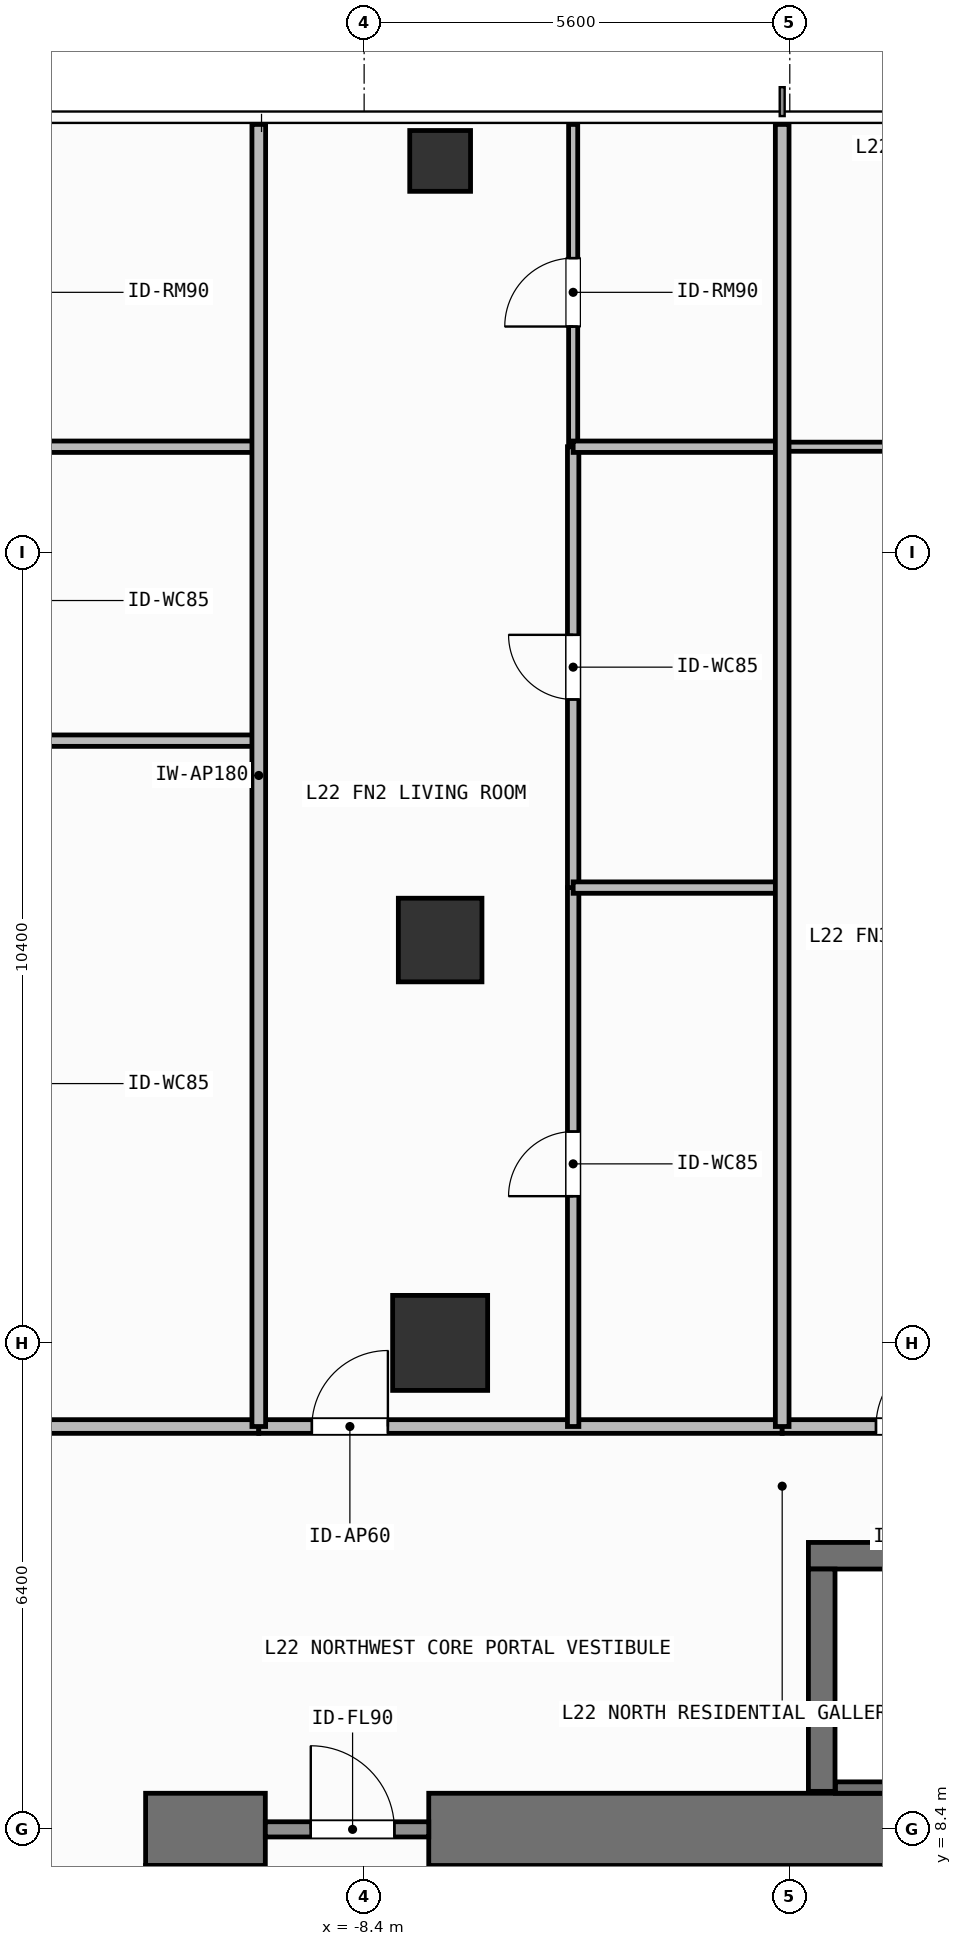
"""IFC4 building model, lengths in metres.
Left out: names, types, materials, properties, quantities, classifications, styles, units other than length and angle.
Written with IfcOpenShell. Run it as: python <this file> out.ifc"""

import sys

from ifc_helpers import new_model, si_unit, direction, frame, frame_2d, origin, origin_2d, place, context, subcontext, project, spatial, rectangle, hollow_rectangle, extrude, element, fill, save


model = new_model("IFC4")
c1 = context("Model", 3, precision=1e-05, world=origin(), true_north=direction((0.0, 1.0)))
c2 = subcontext(c1, "Body", "Model", "MODEL_VIEW")
j1 = project(units=[si_unit("LENGTHUNIT", "METRE"), si_unit("PLANEANGLEUNIT", "RADIAN")], contexts=[c1])
p1 = place(None, origin())
s1 = spatial("IfcSite", under=j1, at=p1, CompositionType="ELEMENT")
p2 = place(p1, origin())
s2 = spatial("IfcBuilding", under=s1, at=p2, CompositionType="ELEMENT")
p3 = place(p2, frame((0.0, 0.0, 89.1)))
s3 = spatial("IfcBuildingStorey", under=s2, at=p3, CompositionType="ELEMENT", Elevation=89.1)
p4 = place(p3, frame((-11.275, 8.4, 0.0), z_axis=(0.0, 0.0, 1.0), x_axis=(1.0, 0.0, 0.0)))
e1 = element("IfcWall", 1, at=p4, inside=s3, PredefinedType="SHEAR", context=c2, shape_type="SweptSolid", body=[
    extrude(rectangle(XDim=1.575, YDim=0.95, at=frame_2d((0.788, 0.0))), origin(), (0.0, 0.0, 1.0), 3.9),
])
p5 = place(p3, frame((-7.55, 8.4, 0.0), z_axis=(0.0, 0.0, 1.0), x_axis=(1.0, 0.0, 0.0)))
e2 = element("IfcWall", 2, at=p5, inside=s3, PredefinedType="SHEAR", context=c2, shape_type="SweptSolid", body=[
    extrude(rectangle(XDim=16.425, YDim=0.95, at=frame_2d((8.212, 0.0))), origin(), (0.0, 0.0, 1.0), 3.9),
])
p6 = place(p3, frame((-10.8, -7.925, 0.0), z_axis=(0.0, 0.0, 1.0), x_axis=(0.0, 1.0, 0.0)))
e3 = element("IfcWall", 3, at=p6, inside=s3, PredefinedType="SHEAR", context=c2, shape_type="SweptSolid", body=[
    extrude(rectangle(XDim=15.85, YDim=0.95, at=frame_2d((7.925, 0.0))), origin(), (0.0, 0.0, 1.0), 3.9),
])
p7 = place(p3, frame((-2.555, 12.0, 0.0), z_axis=(0.0, 0.0, 1.0), x_axis=(1.0, 0.0, 0.0)))
e4 = element("IfcWall", 4, at=p7, inside=s3, PredefinedType="SHEAR", context=c2, shape_type="SweptSolid", body=[
    extrude(rectangle(XDim=7.31, YDim=0.35, at=frame_2d((3.655, 0.0))), origin(), (0.0, 0.0, 1.0), 3.9),
])
p8 = place(p3, frame((-2.2, 8.95, 0.0), z_axis=(0.0, 0.0, 1.0), x_axis=(1.0, 0.0, 0.0)))
e5 = element("IfcWall", 5, at=p8, inside=s3, PredefinedType="SHEAR", context=c2, shape_type="SweptSolid", body=[
    extrude(rectangle(XDim=6.6, YDim=0.15, at=frame_2d((3.3, 0.0))), origin(), (0.0, 0.0, 1.0), 3.9),
])
p9 = place(p3, frame((-2.38, 8.9, 0.0), z_axis=(0.0, 0.0, 1.0), x_axis=(0.0, 1.0, 0.0)))
e6 = element("IfcWall", 6, at=p9, inside=s3, PredefinedType="SHEAR", context=c2, shape_type="SweptSolid", body=[
    extrude(rectangle(XDim=2.925, YDim=0.35, at=frame_2d((1.462, 0.0))), origin(), (0.0, 0.0, 1.0), 3.9),
])
p10 = place(p3, frame((-7.4, 14.8, 0.0), z_axis=(0.0, 0.0, 1.0), x_axis=(1.0, 0.0, 0.0)))
e7 = element("IfcColumn", 7, at=p10, inside=s3, PredefinedType="COLUMN", context=c2, shape_type="SweptSolid", body=[
    extrude(rectangle(XDim=1.25, YDim=1.25, at=origin_2d()), origin(), (0.0, 0.0, 1.0), 3.9),
])
p11 = place(p3, frame((-7.4, 20.1, 0.0), z_axis=(0.0, 0.0, 1.0), x_axis=(1.0, 0.0, 0.0)))
e8 = element("IfcColumn", 8, at=p11, inside=s3, PredefinedType="COLUMN", context=c2, shape_type="SweptSolid", body=[
    extrude(rectangle(XDim=1.1, YDim=1.1, at=origin_2d()), origin(), (0.0, 0.0, 1.0), 3.9),
])
p12 = place(p3, frame((-7.4, 30.35, 0.0), z_axis=(0.0, 0.0, 1.0), x_axis=(1.0, 0.0, 0.0)))
e9 = element("IfcColumn", 9, at=p12, inside=s3, PredefinedType="COLUMN", context=c2, shape_type="SweptSolid", body=[
    extrude(hollow_rectangle(XDim=0.8, YDim=0.8, WallThickness=0.036, at=origin_2d()), origin(), (0.0, 0.0, 1.0), 3.9),
])
p13 = place(p3, frame((-9.7, 8.4, 0.0), z_axis=(0.0, 0.0, 1.0), x_axis=(1.0, 0.0, 0.0)))
e10 = element("IfcWall", 10, at=p13, inside=s3, PredefinedType="SOLIDWALL", context=c2, shape_type="SweptSolid", body=[
    extrude(rectangle(XDim=2.15, YDim=0.2, at=frame_2d((1.075, 0.0))), origin(), (0.0, 0.0, 1.0), 2.72),
])
p14 = place(p13, frame((0.598, 0.0, 0.0)))
e11 = element("IfcOpeningElement", 11, at=p14, cuts=e10, PredefinedType="OPENING", context=c2, shape_type="SweptSolid", body=[
    extrude(rectangle(XDim=1.1, YDim=2.15, at=frame_2d((0.55, 1.075))), frame((0.0, 0.11, 0.0), z_axis=(0.0, -1.0, 0.0), x_axis=(1.0, 0.0, 0.0)), (0.0, 0.0, 1.0), 0.22),
])
p15 = place(p3, frame((-24.42, 13.7, 0.0), z_axis=(0.0, 0.0, 1.0), x_axis=(1.0, 0.0, 0.0)))
e12 = element("IfcWall", 12, at=p15, inside=s3, PredefinedType="PARTITIONING", context=c2, shape_type="SweptSolid", body=[
    extrude(rectangle(XDim=14.634, YDim=0.18, at=frame_2d((7.317, 0.0))), origin(), (0.0, 0.0, 1.0), 3.68),
])
p16 = place(p15, frame((6.457, 0.0, 0.0)))
e13 = element("IfcOpeningElement", 13, at=p16, cuts=e12, PredefinedType="OPENING", context=c2, shape_type="SweptSolid", body=[
    extrude(rectangle(XDim=1.0, YDim=2.2, at=frame_2d((0.5, 1.1))), frame((0.0, 0.1, 0.0), z_axis=(0.0, -1.0, 0.0), x_axis=(1.0, 0.0, 0.0)), (0.0, 0.0, 1.0), 0.2),
])
p17 = place(p3, frame((-9.786, 13.7, 0.0), z_axis=(0.0, 0.0, 1.0), x_axis=(1.0, 0.0, 0.0)))
e14 = element("IfcWall", 14, at=p17, inside=s3, PredefinedType="PARTITIONING", context=c2, shape_type="SweptSolid", body=[
    extrude(rectangle(XDim=6.886, YDim=0.18, at=frame_2d((3.443, 0.0))), origin(), (0.0, 0.0, 1.0), 3.68),
])
p18 = place(p17, frame((0.698, 0.0, 0.0)))
e15 = element("IfcOpeningElement", 15, at=p18, cuts=e14, PredefinedType="OPENING", context=c2, shape_type="SweptSolid", body=[
    extrude(rectangle(XDim=1.0, YDim=2.2, at=frame_2d((0.5, 1.1))), frame((0.0, 0.1, 0.0), z_axis=(0.0, -1.0, 0.0), x_axis=(1.0, 0.0, 0.0)), (0.0, 0.0, 1.0), 0.2),
])
p19 = place(p3, frame((-5.65, 13.7, 0.0), z_axis=(0.0, 0.0, 1.0), x_axis=(0.0, 1.0, 0.0)))
e16 = element("IfcWall", 16, at=p19, inside=s3, PredefinedType="PARTITIONING", context=c2, shape_type="SweptSolid", body=[
    extrude(rectangle(XDim=7.09, YDim=0.15, at=frame_2d((3.545, 0.0))), origin(), (0.0, 0.0, 1.0), 3.68),
])
p20 = place(p19, frame((3.03, 0.0, 0.0)))
e17 = element("IfcOpeningElement", 17, at=p20, cuts=e16, PredefinedType="OPENING", context=c2, shape_type="SweptSolid", body=[
    extrude(rectangle(XDim=0.85, YDim=2.1, at=frame_2d((0.425, 1.05))), frame((0.0, 0.085, 0.0), z_axis=(0.0, -1.0, 0.0), x_axis=(1.0, 0.0, 0.0)), (0.0, 0.0, 1.0), 0.17),
])
p21 = place(p3, frame((-5.65, 20.79, 0.0), z_axis=(0.0, 0.0, 1.0), x_axis=(0.0, 1.0, 0.0)))
e18 = element("IfcWall", 18, at=p21, inside=s3, PredefinedType="PARTITIONING", context=c2, shape_type="SweptSolid", body=[
    extrude(rectangle(XDim=5.8, YDim=0.15, at=frame_2d((2.9, 0.0))), origin(), (0.0, 0.0, 1.0), 3.68),
])
p22 = place(p21, frame((2.475, 0.0, 0.0)))
e19 = element("IfcOpeningElement", 19, at=p22, cuts=e18, PredefinedType="OPENING", context=c2, shape_type="SweptSolid", body=[
    extrude(rectangle(XDim=0.85, YDim=2.1, at=frame_2d((0.425, 1.05))), frame((0.0, 0.085, 0.0), z_axis=(0.0, -1.0, 0.0), x_axis=(1.0, 0.0, 0.0)), (0.0, 0.0, 1.0), 0.17),
])
p23 = place(p3, frame((-5.65, 26.59, 0.0), z_axis=(0.0, 0.0, 1.0), x_axis=(0.0, 1.0, 0.0)))
e20 = element("IfcWall", 20, at=p23, inside=s3, PredefinedType="PARTITIONING", context=c2, shape_type="SweptSolid", body=[
    extrude(rectangle(XDim=4.24, YDim=0.12, at=frame_2d((2.12, 0.0))), origin(), (0.0, 0.0, 1.0), 3.68),
])
p24 = place(p23, frame((1.581, 0.0, 0.0)))
e21 = element("IfcOpeningElement", 21, at=p24, cuts=e20, PredefinedType="OPENING", context=c2, shape_type="SweptSolid", body=[
    extrude(rectangle(XDim=0.9, YDim=2.1, at=frame_2d((0.45, 1.05))), frame((0.0, 0.07, 0.0), z_axis=(0.0, -1.0, 0.0), x_axis=(1.0, 0.0, 0.0)), (0.0, 0.0, 1.0), 0.14),
])
p25 = place(p3, frame((-2.9, 13.7, 0.0), z_axis=(0.0, 0.0, 1.0), x_axis=(1.0, 0.0, 0.0)))
e22 = element("IfcWall", 22, at=p25, inside=s3, PredefinedType="PARTITIONING", context=c2, shape_type="SweptSolid", body=[
    extrude(rectangle(XDim=9.017, YDim=0.18, at=frame_2d((4.508, 0.0))), origin(), (0.0, 0.0, 1.0), 3.68),
])
p26 = place(p25, frame((1.234, 0.0, 0.0)))
e23 = element("IfcOpeningElement", 23, at=p26, cuts=e22, PredefinedType="OPENING", context=c2, shape_type="SweptSolid", body=[
    extrude(rectangle(XDim=1.0, YDim=2.2, at=frame_2d((0.5, 1.1))), frame((0.0, 0.1, 0.0), z_axis=(0.0, -1.0, 0.0), x_axis=(1.0, 0.0, 0.0)), (0.0, 0.0, 1.0), 0.2),
])
p27 = place(p3, frame((-2.9, 26.59, 0.0), z_axis=(0.0, 0.0, 1.0), x_axis=(1.0, 0.0, 0.0)))
e24 = element("IfcWall", 24, at=p27, inside=s3, PredefinedType="PARTITIONING", context=c2, shape_type="SweptSolid", body=[
    extrude(rectangle(XDim=4.828, YDim=0.12, at=frame_2d((2.414, 0.0))), origin(), (0.0, 0.0, 1.0), 3.68),
])
p28 = place(p27, frame((1.878, 0.0, 0.0)))
e25 = element("IfcOpeningElement", 25, at=p28, cuts=e24, PredefinedType="OPENING", context=c2, shape_type="SweptSolid", body=[
    extrude(rectangle(XDim=0.9, YDim=2.1, at=frame_2d((0.45, 1.05))), frame((0.0, 0.07, 0.0), z_axis=(0.0, -1.0, 0.0), x_axis=(1.0, 0.0, 0.0)), (0.0, 0.0, 1.0), 0.14),
])
for number, where, z_axis, x_axis in (
    (26, (-12.873, 22.723, 0.0), (0.0, 0.0, 1.0), (1.0, 0.0, 0.0)),
    (27, (-12.873, 26.59, 0.0), (0.0, 0.0, 1.0), (1.0, 0.0, 0.0)),
):
    element("IfcWall", number, at=place(p3, frame(where, z_axis=z_axis, x_axis=x_axis)), inside=s3, PredefinedType="PARTITIONING", context=c2, shape_type="SweptSolid", body=[
        extrude(rectangle(XDim=3.087, YDim=0.15, at=frame_2d((1.543, 0.0))), origin(), (0.0, 0.0, 1.0), 3.68),
    ])
for number, where, z_axis, x_axis in (
    (28, (-5.65, 20.79, 0.0), (0.0, 0.0, 1.0), (1.0, 0.0, 0.0)),
    (29, (-5.65, 26.59, 0.0), (0.0, 0.0, 1.0), (1.0, 0.0, 0.0)),
):
    element("IfcWall", number, at=place(p3, frame(where, z_axis=z_axis, x_axis=x_axis)), inside=s3, PredefinedType="PARTITIONING", context=c2, shape_type="SweptSolid", body=[
        extrude(rectangle(XDim=2.75, YDim=0.15, at=frame_2d((1.375, 0.0))), origin(), (0.0, 0.0, 1.0), 3.68),
    ])
for number, where, z_axis, x_axis in (
    (30, (-9.786, 13.7, 0.0), (0.0, 0.0, 1.0), (0.0, 1.0, 0.0)),
    (31, (-2.9, 13.7, 0.0), (0.0, 0.0, 1.0), (0.0, 1.0, 0.0)),
):
    element("IfcWall", number, at=place(p3, frame(where, z_axis=z_axis, x_axis=x_axis)), inside=s3, PredefinedType="PARTITIONING", context=c2, shape_type="SweptSolid", body=[
        extrude(rectangle(XDim=17.13, YDim=0.18, at=frame_2d((8.565, 0.0))), origin(), (0.0, 0.0, 1.0), 3.68),
    ])
p29 = place(p14, origin())
e32 = element("IfcDoor", 32, at=p29, inside=s3, OperationType="SINGLE_SWING_LEFT", PredefinedType="DOOR", context=c2, shape_type="SweptSolid", body=[
    extrude(rectangle(XDim=1.1, YDim=2.15, at=frame_2d((0.55, 1.075))), frame((0.0, 0.025, 0.0), z_axis=(0.0, -1.0, 0.0), x_axis=(1.0, 0.0, 0.0)), (0.0, 0.0, 1.0), 0.05),
])
fill(e11, e32)
p30 = place(p18, origin())
e33 = element("IfcDoor", 33, at=p30, inside=s3, OperationType="SINGLE_SWING_RIGHT", PredefinedType="DOOR", context=c2, shape_type="SweptSolid", body=[
    extrude(rectangle(XDim=1.0, YDim=2.2, at=frame_2d((0.5, 1.1))), frame((0.0, 0.025, 0.0), z_axis=(0.0, -1.0, 0.0), x_axis=(1.0, 0.0, 0.0)), (0.0, 0.0, 1.0), 0.05),
])
fill(e15, e33)
p31 = place(p20, origin())
e34 = element("IfcDoor", 34, at=p31, inside=s3, OperationType="SINGLE_SWING_LEFT", PredefinedType="DOOR", context=c2, shape_type="SweptSolid", body=[
    extrude(rectangle(XDim=0.85, YDim=2.1, at=frame_2d((0.425, 1.05))), frame((0.0, 0.025, 0.0), z_axis=(0.0, -1.0, 0.0), x_axis=(1.0, 0.0, 0.0)), (0.0, 0.0, 1.0), 0.05),
])
fill(e17, e34)
p32 = place(p22, origin())
e35 = element("IfcDoor", 35, at=p32, inside=s3, OperationType="SINGLE_SWING_RIGHT", PredefinedType="DOOR", context=c2, shape_type="SweptSolid", body=[
    extrude(rectangle(XDim=0.85, YDim=2.1, at=frame_2d((0.425, 1.05))), frame((0.0, 0.025, 0.0), z_axis=(0.0, -1.0, 0.0), x_axis=(1.0, 0.0, 0.0)), (0.0, 0.0, 1.0), 0.05),
])
fill(e19, e35)
p33 = place(p24, origin())
e36 = element("IfcDoor", 36, at=p33, inside=s3, OperationType="SINGLE_SWING_LEFT", PredefinedType="DOOR", context=c2, shape_type="SweptSolid", body=[
    extrude(rectangle(XDim=0.9, YDim=2.1, at=frame_2d((0.45, 1.05))), frame((0.0, 0.025, 0.0), z_axis=(0.0, -1.0, 0.0), x_axis=(1.0, 0.0, 0.0)), (0.0, 0.0, 1.0), 0.05),
])
fill(e21, e36)
p34 = place(p26, origin())
e37 = element("IfcDoor", 37, at=p34, inside=s3, OperationType="SINGLE_SWING_RIGHT", PredefinedType="DOOR", context=c2, shape_type="SweptSolid", body=[
    extrude(rectangle(XDim=1.0, YDim=2.2, at=frame_2d((0.5, 1.1))), frame((0.0, 0.025, 0.0), z_axis=(0.0, -1.0, 0.0), x_axis=(1.0, 0.0, 0.0)), (0.0, 0.0, 1.0), 0.05),
])
fill(e23, e37)
save(model, sys.argv[1])
